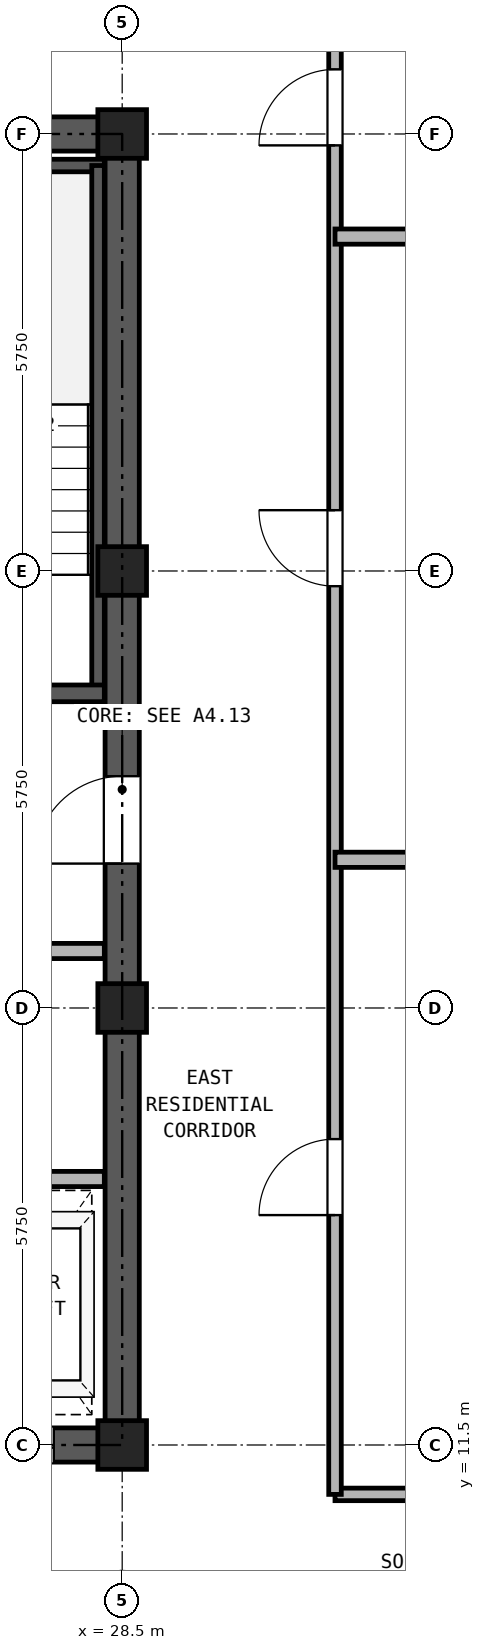
"""IFC4 building model, lengths in metres.
Left out: names, types, materials, properties, quantities, classifications, styles, units other than length and angle.
Written with IfcOpenShell. Run it as: python <this file> out.ifc"""

import sys

from ifc_helpers import new_model, si_unit, direction, frame, frame_2d, origin, origin_2d, place, context, subcontext, project, spatial, rectangle, hollow_rectangle, extrude, source, transform, mapped, element, fill, save


model = new_model("IFC4")
c1 = context("Model", 3, precision=1e-05, world=origin(), true_north=direction((0.0, 1.0)))
c2 = subcontext(c1, "Body", "Model", "MODEL_VIEW")
j1 = project(units=[si_unit("LENGTHUNIT", "METRE"), si_unit("PLANEANGLEUNIT", "RADIAN")], contexts=[c1])
p1 = place(None, origin())
s1 = spatial("IfcSite", under=j1, at=p1, CompositionType="ELEMENT")
p2 = place(p1, origin())
s2 = spatial("IfcBuilding", under=s1, at=p2, CompositionType="ELEMENT")
p3 = place(p2, frame((0.0, 0.0, 202.8)))
s3 = spatial("IfcBuildingStorey", under=s2, at=p3, CompositionType="ELEMENT", Elevation=202.8)
m1 = source(origin(), c2, "Body", "SweptSolid", [
    extrude(hollow_rectangle(XDim=0.64, YDim=0.64, WallThickness=0.035, at=origin_2d()), origin(), (0.0, 0.0, 1.0), 2.95),
])
for number, where, z_axis, x_axis in (
    (1, (28.5, 11.5, 0.0), (0.0, 0.0, 1.0), (1.0, 0.0, 0.0)),
    (2, (28.5, 17.25, 0.0), (0.0, 0.0, 1.0), (1.0, 0.0, 0.0)),
    (3, (28.5, 23.0, 0.0), (0.0, 0.0, 1.0), (1.0, 0.0, 0.0)),
    (4, (28.5, 28.75, 0.0), (0.0, 0.0, 1.0), (1.0, 0.0, 0.0)),
):
    element("IfcColumn", number, at=place(p3, frame(where, z_axis=z_axis, x_axis=x_axis)), inside=s3, PredefinedType="COLUMN", context=c2, shape_type="MappedRepresentation", body=[
        mapped(m1, transform((0.0, 0.0, 0.0), x_axis=(1.0, 0.0, 0.0), y_axis=(0.0, 1.0, 0.0), z_axis=(0.0, 0.0, 1.0), scale=1.0)),
    ])
p4 = place(p3, frame((18.275, 11.5, 0.0), z_axis=(0.0, 0.0, 1.0), x_axis=(1.0, 0.0, 0.0)))
e5 = element("IfcWall", 5, at=p4, inside=s3, PredefinedType="SHEAR", context=c2, shape_type="SweptSolid", body=[
    extrude(rectangle(XDim=10.45, YDim=0.45, at=frame_2d((5.225, 0.0))), origin(), (0.0, 0.0, 1.0), 2.95),
])
p5 = place(p4, frame((1.825, 0.0, 0.0)))
e6 = element("IfcOpeningElement", 6, at=p5, cuts=e5, PredefinedType="OPENING", context=c2, shape_type="SweptSolid", body=[
    extrude(rectangle(XDim=0.95, YDim=2.15, at=frame_2d((0.475, 1.075))), frame((0.0, 0.235, 0.0), z_axis=(0.0, -1.0, 0.0), x_axis=(1.0, 0.0, 0.0)), (0.0, 0.0, 1.0), 0.47),
])
p6 = place(p4, frame((5.325, 0.0, 0.0)))
e7 = element("IfcOpeningElement", 7, at=p6, cuts=e5, PredefinedType="OPENING", context=c2, shape_type="SweptSolid", body=[
    extrude(rectangle(XDim=0.95, YDim=2.15, at=frame_2d((0.475, 1.075))), frame((0.0, 0.235, 0.0), z_axis=(0.0, -1.0, 0.0), x_axis=(1.0, 0.0, 0.0)), (0.0, 0.0, 1.0), 0.47),
])
p7 = place(p4, frame((8.225, 0.0, 0.0)))
e8 = element("IfcOpeningElement", 8, at=p7, cuts=e5, PredefinedType="OPENING", context=c2, shape_type="SweptSolid", body=[
    extrude(rectangle(XDim=1.1, YDim=2.25, at=frame_2d((0.55, 1.125))), frame((0.0, 0.235, 0.0), z_axis=(0.0, -1.0, 0.0), x_axis=(1.0, 0.0, 0.0)), (0.0, 0.0, 1.0), 0.47),
])
p8 = place(p3, frame((18.275, 28.75, 0.0), z_axis=(0.0, 0.0, 1.0), x_axis=(1.0, 0.0, 0.0)))
e9 = element("IfcWall", 9, at=p8, inside=s3, PredefinedType="SHEAR", context=c2, shape_type="SweptSolid", body=[
    extrude(rectangle(XDim=10.45, YDim=0.45, at=frame_2d((5.225, 0.0))), origin(), (0.0, 0.0, 1.0), 2.95),
])
p9 = place(p8, frame((4.105, 0.0, 0.0)))
e10 = element("IfcOpeningElement", 10, at=p9, cuts=e9, PredefinedType="OPENING", context=c2, shape_type="SweptSolid", body=[
    extrude(rectangle(XDim=0.9, YDim=2.05, at=frame_2d((0.45, 1.025))), frame((0.0, 0.235, 0.0), z_axis=(0.0, -1.0, 0.0), x_axis=(1.0, 0.0, 0.0)), (0.0, 0.0, 1.0), 0.47),
])
p10 = place(p8, frame((5.645, 0.0, 0.0)))
e11 = element("IfcOpeningElement", 11, at=p10, cuts=e9, PredefinedType="OPENING", context=c2, shape_type="SweptSolid", body=[
    extrude(rectangle(XDim=0.9, YDim=2.05, at=frame_2d((0.45, 1.025))), frame((0.0, 0.235, 0.0), z_axis=(0.0, -1.0, 0.0), x_axis=(1.0, 0.0, 0.0)), (0.0, 0.0, 1.0), 0.47),
])
p11 = place(p3, frame((28.5, 11.725, 0.0), z_axis=(0.0, 0.0, 1.0), x_axis=(0.0, 1.0, 0.0)))
e12 = element("IfcWall", 12, at=p11, inside=s3, PredefinedType="SHEAR", context=c2, shape_type="SweptSolid", body=[
    extrude(rectangle(XDim=16.8, YDim=0.45, at=frame_2d((8.4, 0.0))), origin(), (0.0, 0.0, 1.0), 2.95),
])
p12 = place(p11, frame((7.425, 0.0, 0.0)))
e13 = element("IfcOpeningElement", 13, at=p12, cuts=e12, PredefinedType="OPENING", context=c2, shape_type="SweptSolid", body=[
    extrude(rectangle(XDim=1.15, YDim=2.2, at=frame_2d((0.575, 1.1))), frame((0.0, 0.235, 0.0), z_axis=(0.0, -1.0, 0.0), x_axis=(1.0, 0.0, 0.0)), (0.0, 0.0, 1.0), 0.47),
])
p13 = place(p3, frame((25.13, 28.335, 0.0), z_axis=(0.0, 0.0, 1.0), x_axis=(1.0, 0.0, 0.0)))
e14 = element("IfcWall", 14, at=p13, inside=s3, PredefinedType="PARTITIONING", context=c2, shape_type="SweptSolid", body=[
    extrude(rectangle(XDim=3.135, YDim=0.165, at=frame_2d((1.567, 0.0))), origin(), (0.0, 0.0, 1.0), 2.95),
])
p14 = place(p3, frame((28.183, 21.39, 0.0), z_axis=(0.0, 0.0, 1.0), x_axis=(0.0, 1.0, 0.0)))
e15 = element("IfcWall", 15, at=p14, inside=s3, PredefinedType="PARTITIONING", context=c2, shape_type="SweptSolid", body=[
    extrude(rectangle(XDim=6.945, YDim=0.165, at=frame_2d((3.473, 0.0))), origin(), (0.0, 0.0, 1.0), 2.95),
])
p15 = place(p3, frame((25.13, 21.39, 0.0), z_axis=(0.0, 0.0, 1.0), x_axis=(1.0, 0.0, 0.0)))
e16 = element("IfcWall", 16, at=p15, inside=s3, PredefinedType="SOLIDWALL", context=c2, shape_type="SweptSolid", body=[
    extrude(rectangle(XDim=3.135, YDim=0.22, at=frame_2d((1.567, 0.0))), origin(), (0.0, 0.0, 1.0), 2.95),
])
p16 = place(p15, frame((0.92, 0.0, 0.0)))
e17 = element("IfcOpeningElement", 17, at=p16, cuts=e16, PredefinedType="OPENING", context=c2, shape_type="SweptSolid", body=[
    extrude(rectangle(XDim=1.15, YDim=2.2, at=frame_2d((0.575, 1.1))), frame((0.0, 0.12, 0.0), z_axis=(0.0, -1.0, 0.0), x_axis=(1.0, 0.0, 0.0)), (0.0, 0.0, 1.0), 0.24),
])
p17 = place(p3, frame((18.735, 18.0, 0.0), z_axis=(0.0, 0.0, 1.0), x_axis=(1.0, 0.0, 0.0)))
e18 = element("IfcWall", 18, at=p17, inside=s3, PredefinedType="PARTITIONING", context=c2, shape_type="SweptSolid", body=[
    extrude(rectangle(XDim=9.53, YDim=0.2, at=frame_2d((4.765, 0.0))), origin(), (0.0, 0.0, 1.0), 2.95),
])
p18 = place(p17, frame((0.515, 0.0, 0.0)))
e19 = element("IfcOpeningElement", 19, at=p18, cuts=e18, PredefinedType="OPENING", context=c2, shape_type="SweptSolid", body=[
    extrude(rectangle(XDim=1.3, YDim=2.3, at=frame_2d((0.65, 1.15))), frame((0.0, 0.11, 0.0), z_axis=(0.0, -1.0, 0.0), x_axis=(1.0, 0.0, 0.0)), (0.0, 0.0, 1.0), 0.22),
])
p19 = place(p17, frame((2.615, 0.0, 0.0)))
e20 = element("IfcOpeningElement", 20, at=p19, cuts=e18, PredefinedType="OPENING", context=c2, shape_type="SweptSolid", body=[
    extrude(rectangle(XDim=1.3, YDim=2.3, at=frame_2d((0.65, 1.15))), frame((0.0, 0.11, 0.0), z_axis=(0.0, -1.0, 0.0), x_axis=(1.0, 0.0, 0.0)), (0.0, 0.0, 1.0), 0.22),
])
p20 = place(p17, frame((7.115, 0.0, 0.0)))
e21 = element("IfcOpeningElement", 21, at=p20, cuts=e18, PredefinedType="OPENING", context=c2, shape_type="SweptSolid", body=[
    extrude(rectangle(XDim=1.0, YDim=2.15, at=frame_2d((0.5, 1.075))), frame((0.0, 0.11, 0.0), z_axis=(0.0, -1.0, 0.0), x_axis=(1.0, 0.0, 0.0)), (0.0, 0.0, 1.0), 0.22),
])
p21 = place(p3, frame((18.735, 15.0, 0.0), z_axis=(0.0, 0.0, 1.0), x_axis=(1.0, 0.0, 0.0)))
e22 = element("IfcWall", 22, at=p21, inside=s3, PredefinedType="PARTITIONING", context=c2, shape_type="SweptSolid", body=[
    extrude(rectangle(XDim=9.53, YDim=0.2, at=frame_2d((4.765, 0.0))), origin(), (0.0, 0.0, 1.0), 2.95),
])
p22 = place(p3, frame((31.3, 10.85, 0.0), z_axis=(0.0, 0.0, 1.0), x_axis=(1.0, 0.0, 0.0)))
e23 = element("IfcWall", 23, at=p22, inside=s3, PredefinedType="PARTITIONING", context=c2, shape_type="SweptSolid", body=[
    extrude(rectangle(XDim=6.9, YDim=0.165, at=frame_2d((3.45, 0.0))), origin(), (0.0, 0.0, 1.0), 2.95),
])
p23 = place(p3, frame((31.3, 10.85, 0.0), z_axis=(0.0, 0.0, 1.0), x_axis=(0.0, 1.0, 0.0)))
e24 = element("IfcWall", 24, at=p23, inside=s3, PredefinedType="PARTITIONING", context=c2, shape_type="SweptSolid", body=[
    extrude(rectangle(XDim=24.29, YDim=0.165, at=frame_2d((12.145, 0.0))), origin(), (0.0, 0.0, 1.0), 2.95),
])
p24 = place(p23, frame((3.675, 0.0, 0.0)))
e25 = element("IfcOpeningElement", 25, at=p24, cuts=e24, PredefinedType="OPENING", context=c2, shape_type="SweptSolid", body=[
    extrude(rectangle(XDim=1.0, YDim=2.15, at=frame_2d((0.5, 1.075))), frame((0.0, 0.093, 0.0), z_axis=(0.0, -1.0, 0.0), x_axis=(1.0, 0.0, 0.0)), (0.0, 0.0, 1.0), 0.185),
])
p25 = place(p23, frame((11.95, 0.0, 0.0)))
e26 = element("IfcOpeningElement", 26, at=p25, cuts=e24, PredefinedType="OPENING", context=c2, shape_type="SweptSolid", body=[
    extrude(rectangle(XDim=1.0, YDim=2.15, at=frame_2d((0.5, 1.075))), frame((0.0, 0.093, 0.0), z_axis=(0.0, -1.0, 0.0), x_axis=(1.0, 0.0, 0.0)), (0.0, 0.0, 1.0), 0.185),
])
p26 = place(p23, frame((17.75, 0.0, 0.0)))
e27 = element("IfcOpeningElement", 27, at=p26, cuts=e24, PredefinedType="OPENING", context=c2, shape_type="SweptSolid", body=[
    extrude(rectangle(XDim=1.0, YDim=2.15, at=frame_2d((0.5, 1.075))), frame((0.0, 0.093, 0.0), z_axis=(0.0, -1.0, 0.0), x_axis=(1.0, 0.0, 0.0)), (0.0, 0.0, 1.0), 0.185),
])
for number, where, z_axis, x_axis in (
    (28, (31.3, 19.2, 0.0), (0.0, 0.0, 1.0), (1.0, 0.0, 0.0)),
    (29, (31.3, 27.4, 0.0), (0.0, 0.0, 1.0), (1.0, 0.0, 0.0)),
):
    element("IfcWall", number, at=place(p3, frame(where, z_axis=z_axis, x_axis=x_axis)), inside=s3, PredefinedType="PARTITIONING", context=c2, shape_type="SweptSolid", body=[
        extrude(rectangle(XDim=10.34, YDim=0.2, at=frame_2d((5.17, 0.0))), origin(), (0.0, 0.0, 1.0), 2.95),
    ])
p27 = place(p12, origin())
e30 = element("IfcDoor", 30, at=p27, inside=s3, OperationType="SINGLE_SWING_LEFT", PredefinedType="DOOR", context=c2, shape_type="SweptSolid", body=[
    extrude(rectangle(XDim=1.15, YDim=2.2, at=frame_2d((0.575, 1.1))), frame((0.0, 0.025, 0.0), z_axis=(0.0, -1.0, 0.0), x_axis=(1.0, 0.0, 0.0)), (0.0, 0.0, 1.0), 0.05),
])
fill(e13, e30)
p28 = place(p7, frame((1.1, 0.0, 0.0), z_axis=(0.0, 0.0, 1.0), x_axis=(-1.0, 0.0, 0.0)))
e31 = element("IfcDoor", 31, at=p28, inside=s3, OperationType="DOUBLE_DOOR_SLIDING", PredefinedType="DOOR", context=c2, shape_type="SweptSolid", body=[
    extrude(rectangle(XDim=1.1, YDim=2.25, at=frame_2d((0.55, 1.125))), frame((0.0, 0.025, 0.0), z_axis=(0.0, -1.0, 0.0), x_axis=(1.0, 0.0, 0.0)), (0.0, 0.0, 1.0), 0.05),
])
fill(e8, e31)
p29 = place(p24, frame((1.0, 0.0, 0.0), z_axis=(0.0, 0.0, 1.0), x_axis=(-1.0, 0.0, 0.0)))
e32 = element("IfcDoor", 32, at=p29, inside=s3, OperationType="SINGLE_SWING_LEFT", PredefinedType="DOOR", context=c2, shape_type="SweptSolid", body=[
    extrude(rectangle(XDim=1.0, YDim=2.15, at=frame_2d((0.5, 1.075))), frame((0.0, 0.025, 0.0), z_axis=(0.0, -1.0, 0.0), x_axis=(1.0, 0.0, 0.0)), (0.0, 0.0, 1.0), 0.05),
])
fill(e25, e32)
p30 = place(p25, frame((1.0, 0.0, 0.0), z_axis=(0.0, 0.0, 1.0), x_axis=(-1.0, 0.0, 0.0)))
e33 = element("IfcDoor", 33, at=p30, inside=s3, OperationType="SINGLE_SWING_RIGHT", PredefinedType="DOOR", context=c2, shape_type="SweptSolid", body=[
    extrude(rectangle(XDim=1.0, YDim=2.15, at=frame_2d((0.5, 1.075))), frame((0.0, 0.025, 0.0), z_axis=(0.0, -1.0, 0.0), x_axis=(1.0, 0.0, 0.0)), (0.0, 0.0, 1.0), 0.05),
])
fill(e26, e33)
p31 = place(p26, frame((1.0, 0.0, 0.0), z_axis=(0.0, 0.0, 1.0), x_axis=(-1.0, 0.0, 0.0)))
e34 = element("IfcDoor", 34, at=p31, inside=s3, OperationType="SINGLE_SWING_LEFT", PredefinedType="DOOR", context=c2, shape_type="SweptSolid", body=[
    extrude(rectangle(XDim=1.0, YDim=2.15, at=frame_2d((0.5, 1.075))), frame((0.0, 0.025, 0.0), z_axis=(0.0, -1.0, 0.0), x_axis=(1.0, 0.0, 0.0)), (0.0, 0.0, 1.0), 0.05),
])
fill(e27, e34)
save(model, sys.argv[1])
